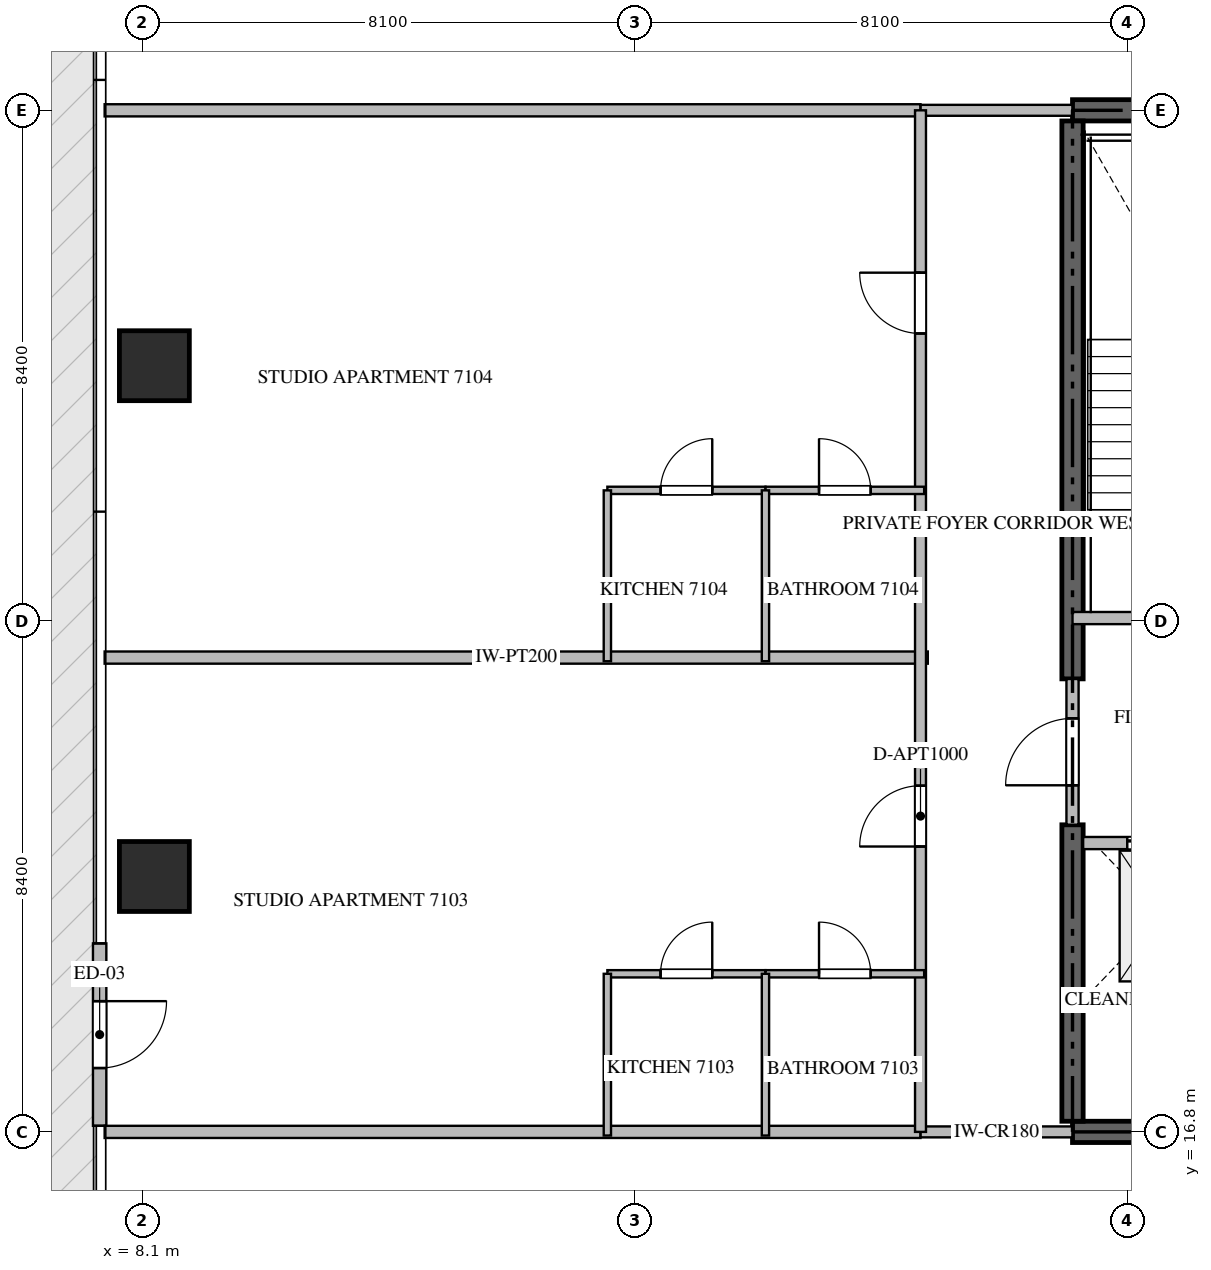
"""IFC4 building model, lengths in metres.
Left out: names, types, materials, properties, quantities, classifications, styles, units other than length and angle.
Written with IfcOpenShell. Run it as: python <this file> out.ifc"""

import sys

from ifc_helpers import new_model, si_unit, direction, frame, frame_2d, origin, origin_2d, place, context, subcontext, project, spatial, rectangle, extrude, source, transform, mapped, element, fill, save


model = new_model("IFC4")
c1 = context("Model", 3, precision=1e-05, world=origin(), true_north=direction((0.0, 1.0)))
c2 = subcontext(c1, "Body", "Model", "MODEL_VIEW")
j1 = project(units=[si_unit("LENGTHUNIT", "METRE"), si_unit("PLANEANGLEUNIT", "RADIAN")], contexts=[c1])
p1 = place(None, origin())
s1 = spatial("IfcSite", under=j1, at=p1, CompositionType="ELEMENT")
p2 = place(p1, origin())
s2 = spatial("IfcBuilding", under=s1, at=p2, CompositionType="ELEMENT")
p3 = place(p2, frame((0.0, 0.0, 283.6)))
s3 = spatial("IfcBuildingStorey", under=s2, at=p3, CompositionType="ELEMENT", Elevation=283.6)
for number, where, z_axis, x_axis in (
    (1, (23.4, 16.8, -0.26), (0.0, 0.0, 1.0), (1.0, 0.0, 0.0)),
    (2, (41.4, 33.6, -0.26), (0.0, 0.0, 1.0), (-1.0, 0.0, 0.0)),
):
    element("IfcWall", number, at=place(p3, frame(where, z_axis=z_axis, x_axis=x_axis)), inside=s3, PredefinedType="SHEAR", context=c2, shape_type="SweptSolid", body=[
        extrude(rectangle(XDim=18.0, YDim=0.35, at=frame_2d((9.0, 0.0))), origin(), (0.0, 0.0, 1.0), 3.668),
    ])
p4 = place(p3, frame((23.4, 16.975, -0.26), z_axis=(0.0, 0.0, 1.0), x_axis=(0.0, 1.0, 0.0)))
e3 = element("IfcWall", 3, at=p4, inside=s3, PredefinedType="SHEAR", context=c2, shape_type="SweptSolid", body=[
    extrude(rectangle(XDim=4.875, YDim=0.35, at=frame_2d((2.438, 0.0))), origin(), (0.0, 0.0, 1.0), 3.668),
])
p5 = place(p3, frame((23.4, 24.25, -0.26), z_axis=(0.0, 0.0, 1.0), x_axis=(0.0, 1.0, 0.0)))
e4 = element("IfcWall", 4, at=p5, inside=s3, PredefinedType="SHEAR", context=c2, shape_type="SweptSolid", body=[
    extrude(rectangle(XDim=9.175, YDim=0.35, at=frame_2d((4.587, 0.0))), origin(), (0.0, 0.0, 1.0), 3.668),
])
m1 = source(origin(), c2, "Body", "SweptSolid", [
    extrude(rectangle(XDim=1.15, YDim=1.15, at=origin_2d()), origin(), (0.0, 0.0, 1.0), 3.67),
])
for number, where, z_axis, x_axis in (
    (5, (8.3, 21.0, -0.26), (0.0, 0.0, 1.0), (1.0, 0.0, 0.0)),
    (6, (8.3, 29.4, -0.26), (0.0, 0.0, 1.0), (1.0, 0.0, 0.0)),
):
    element("IfcColumn", number, at=place(p3, frame(where, z_axis=z_axis, x_axis=x_axis)), inside=s3, PredefinedType="COLUMN", context=c2, shape_type="MappedRepresentation", body=[
        mapped(m1, transform((0.0, 0.0, 0.0), scale=1.0)),
    ])
p6 = place(p3, frame((7.4, 19.9, 0.0), z_axis=(0.0, 0.0, 1.0), x_axis=(0.0, -1.0, 0.0)))
e7 = element("IfcWall", 7, at=p6, inside=s3, PredefinedType="ELEMENTEDWALL", context=c2, shape_type="SweptSolid", body=[
    extrude(rectangle(XDim=3.0, YDim=0.22, at=frame_2d((1.5, 0.0))), origin(), (0.0, 0.0, 1.0), 3.395),
])
p7 = place(p6, frame((0.95, 0.0, 0.0)))
e8 = element("IfcOpeningElement", 8, at=p7, cuts=e7, PredefinedType="OPENING", context=c2, shape_type="SweptSolid", body=[
    extrude(rectangle(XDim=1.1, YDim=2.2, at=frame_2d((0.55, 1.1))), frame((0.0, 0.12, 0.0), z_axis=(0.0, -1.0, 0.0), x_axis=(1.0, 0.0, 0.0)), (0.0, 0.0, 1.0), 0.24),
])
p8 = place(p3, frame((23.4, 25.25, 0.0), z_axis=(0.0, 0.0, 1.0), x_axis=(1.0, 0.0, 0.0)))
e9 = element("IfcWall", 9, at=p8, inside=s3, PredefinedType="STANDARD", context=c2, shape_type="SweptSolid", body=[
    extrude(rectangle(XDim=4.45, YDim=0.2, at=frame_2d((2.225, 0.0))), origin(), (0.0, 0.0, 1.0), 3.41),
])
p9 = place(p8, frame((1.65, 0.0, 0.0)))
e10 = element("IfcOpeningElement", 10, at=p9, cuts=e9, PredefinedType="OPENING", context=c2, shape_type="SweptSolid", body=[
    extrude(rectangle(XDim=1.1, YDim=2.15, at=frame_2d((0.55, 1.075))), frame((0.0, 0.11, 0.0), z_axis=(0.0, -1.0, 0.0), x_axis=(1.0, 0.0, 0.0)), (0.0, 0.0, 1.0), 0.22),
])
p10 = place(p3, frame((23.575, 21.55, 0.0), z_axis=(0.0, 0.0, 1.0), x_axis=(1.0, 0.0, 0.0)))
e11 = element("IfcWall", 11, at=p10, inside=s3, PredefinedType="STANDARD", context=c2, shape_type="SweptSolid", body=[
    extrude(rectangle(XDim=2.475, YDim=0.2, at=frame_2d((1.238, 0.0))), origin(), (0.0, 0.0, 1.0), 3.41),
])
p11 = place(p10, frame((0.725, 0.0, 0.0)))
e12 = element("IfcOpeningElement", 12, at=p11, cuts=e11, PredefinedType="OPENING", context=c2, shape_type="SweptSolid", body=[
    extrude(rectangle(XDim=1.2, YDim=2.2, at=frame_2d((0.6, 1.1))), frame((0.0, 0.11, 0.0), z_axis=(0.0, -1.0, 0.0), x_axis=(1.0, 0.0, 0.0)), (0.0, 0.0, 1.0), 0.22),
])
p12 = place(p3, frame((23.575, 19.05, 0.0), z_axis=(0.0, 0.0, 1.0), x_axis=(1.0, 0.0, 0.0)))
e13 = element("IfcWall", 13, at=p12, inside=s3, PredefinedType="STANDARD", context=c2, shape_type="SweptSolid", body=[
    extrude(rectangle(XDim=2.475, YDim=0.2, at=frame_2d((1.238, 0.0))), origin(), (0.0, 0.0, 1.0), 3.41),
])
p13 = place(p3, frame((23.4, 21.852, 0.0), z_axis=(0.0, 0.0, 1.0), x_axis=(0.0, 1.0, 0.0)))
e14 = element("IfcWall", 14, at=p13, inside=s3, PredefinedType="STANDARD", context=c2, shape_type="SweptSolid", body=[
    extrude(rectangle(XDim=2.396, YDim=0.2, at=frame_2d((1.198, 0.0))), origin(), (0.0, 0.0, 1.0), 3.41),
])
p14 = place(p13, frame((0.648, 0.0, 0.0)))
e15 = element("IfcOpeningElement", 15, at=p14, cuts=e14, PredefinedType="OPENING", context=c2, shape_type="SweptSolid", body=[
    extrude(rectangle(XDim=1.1, YDim=2.15, at=frame_2d((0.55, 1.075))), frame((0.0, 0.11, 0.0), z_axis=(0.0, -1.0, 0.0), x_axis=(1.0, 0.0, 0.0)), (0.0, 0.0, 1.0), 0.22),
])
p15 = place(p3, frame((7.482, 24.6, 0.0), z_axis=(0.0, 0.0, 1.0), x_axis=(1.0, 0.0, 0.0)))
e16 = element("IfcWall", 16, at=p15, inside=s3, PredefinedType="PARTITIONING", context=c2, shape_type="SweptSolid", body=[
    extrude(rectangle(XDim=13.538, YDim=0.2, at=frame_2d((6.769, 0.0))), origin(), (0.0, 0.0, 1.0), 3.41),
])
for number, where, z_axis, x_axis in (
    (17, (7.482, 16.8, 0.0), (0.0, 0.0, 1.0), (1.0, 0.0, 0.0)),
    (18, (7.482, 33.6, 0.0), (0.0, 0.0, 1.0), (1.0, 0.0, 0.0)),
):
    element("IfcWall", number, at=place(p3, frame(where, z_axis=z_axis, x_axis=x_axis)), inside=s3, PredefinedType="PARTITIONING", context=c2, shape_type="SweptSolid", body=[
        extrude(rectangle(XDim=13.418, YDim=0.2, at=frame_2d((6.709, 0.0))), origin(), (0.0, 0.0, 1.0), 3.41),
    ])
for number, where, z_axis, x_axis in (
    (19, (20.902, 16.8, 0.0), (0.0, 0.0, 1.0), (1.0, 0.0, 0.0)),
    (20, (20.902, 33.6, 0.0), (0.0, 0.0, 1.0), (1.0, 0.0, 0.0)),
):
    element("IfcWall", number, at=place(p3, frame(where, z_axis=z_axis, x_axis=x_axis)), inside=s3, PredefinedType="PARTITIONING", context=c2, shape_type="SweptSolid", body=[
        extrude(rectangle(XDim=2.496, YDim=0.18, at=frame_2d((1.248, 0.0))), origin(), (0.0, 0.0, 1.0), 3.41),
    ])
p16 = place(p3, frame((20.9, 16.8, 0.0), z_axis=(0.0, 0.0, 1.0), x_axis=(0.0, 1.0, 0.0)))
e21 = element("IfcWall", 21, at=p16, inside=s3, PredefinedType="PARTITIONING", context=c2, shape_type="SweptSolid", body=[
    extrude(rectangle(XDim=16.8, YDim=0.18, at=frame_2d((8.4, 0.0))), origin(), (0.0, 0.0, 1.0), 3.41),
])
p17 = place(p16, frame((4.693, 0.0, 0.0)))
e22 = element("IfcOpeningElement", 22, at=p17, cuts=e21, PredefinedType="OPENING", context=c2, shape_type="SweptSolid", body=[
    extrude(rectangle(XDim=1.0, YDim=2.15, at=frame_2d((0.5, 1.075))), frame((0.0, 0.1, 0.0), z_axis=(0.0, -1.0, 0.0), x_axis=(1.0, 0.0, 0.0)), (0.0, 0.0, 1.0), 0.2),
])
p18 = place(p16, frame((13.13, 0.0, 0.0)))
e23 = element("IfcOpeningElement", 23, at=p18, cuts=e21, PredefinedType="OPENING", context=c2, shape_type="SweptSolid", body=[
    extrude(rectangle(XDim=1.0, YDim=2.15, at=frame_2d((0.5, 1.075))), frame((0.0, 0.1, 0.0), z_axis=(0.0, -1.0, 0.0), x_axis=(1.0, 0.0, 0.0)), (0.0, 0.0, 1.0), 0.2),
])
p19 = place(p3, frame((15.75, 19.4, 0.0), z_axis=(0.0, 0.0, 1.0), x_axis=(1.0, 0.0, 0.0)))
e24 = element("IfcWall", 24, at=p19, inside=s3, PredefinedType="PARTITIONING", context=c2, shape_type="SweptSolid", body=[
    extrude(rectangle(XDim=2.6, YDim=0.12, at=frame_2d((1.3, 0.0))), origin(), (0.0, 0.0, 1.0), 3.41),
])
p20 = place(p19, frame((0.875, 0.0, 0.0)))
e25 = element("IfcOpeningElement", 25, at=p20, cuts=e24, PredefinedType="OPENING", context=c2, shape_type="SweptSolid", body=[
    extrude(rectangle(XDim=0.85, YDim=2.1, at=frame_2d((0.425, 1.05))), frame((0.0, 0.07, 0.0), z_axis=(0.0, -1.0, 0.0), x_axis=(1.0, 0.0, 0.0)), (0.0, 0.0, 1.0), 0.14),
])
p21 = place(p3, frame((18.352, 19.4, 0.0), z_axis=(0.0, 0.0, 1.0), x_axis=(1.0, 0.0, 0.0)))
e26 = element("IfcWall", 26, at=p21, inside=s3, PredefinedType="PARTITIONING", context=c2, shape_type="SweptSolid", body=[
    extrude(rectangle(XDim=2.608, YDim=0.12, at=frame_2d((1.304, 0.0))), origin(), (0.0, 0.0, 1.0), 3.41),
])
p22 = place(p21, frame((0.879, 0.0, 0.0)))
e27 = element("IfcOpeningElement", 27, at=p22, cuts=e26, PredefinedType="OPENING", context=c2, shape_type="SweptSolid", body=[
    extrude(rectangle(XDim=0.85, YDim=2.1, at=frame_2d((0.425, 1.05))), frame((0.0, 0.07, 0.0), z_axis=(0.0, -1.0, 0.0), x_axis=(1.0, 0.0, 0.0)), (0.0, 0.0, 1.0), 0.14),
])
p23 = place(p3, frame((18.35, 16.74, 0.0), z_axis=(0.0, 0.0, 1.0), x_axis=(0.0, 1.0, 0.0)))
e28 = element("IfcWall", 28, at=p23, inside=s3, PredefinedType="PARTITIONING", context=c2, shape_type="SweptSolid", body=[
    extrude(rectangle(XDim=2.66, YDim=0.12, at=frame_2d((1.33, 0.0))), origin(), (0.0, 0.0, 1.0), 3.41),
])
p24 = place(p3, frame((15.75, 16.74, 0.0), z_axis=(0.0, 0.0, 1.0), x_axis=(0.0, 1.0, 0.0)))
e29 = element("IfcWall", 29, at=p24, inside=s3, PredefinedType="PARTITIONING", context=c2, shape_type="SweptSolid", body=[
    extrude(rectangle(XDim=2.66, YDim=0.12, at=frame_2d((1.33, 0.0))), origin(), (0.0, 0.0, 1.0), 2.245),
])
p25 = place(p3, frame((15.75, 27.35, 0.0), z_axis=(0.0, 0.0, 1.0), x_axis=(1.0, 0.0, 0.0)))
e30 = element("IfcWall", 30, at=p25, inside=s3, PredefinedType="PARTITIONING", context=c2, shape_type="SweptSolid", body=[
    extrude(rectangle(XDim=2.6, YDim=0.12, at=frame_2d((1.3, 0.0))), origin(), (0.0, 0.0, 1.0), 3.41),
])
p26 = place(p25, frame((0.875, 0.0, 0.0)))
e31 = element("IfcOpeningElement", 31, at=p26, cuts=e30, PredefinedType="OPENING", context=c2, shape_type="SweptSolid", body=[
    extrude(rectangle(XDim=0.85, YDim=2.1, at=frame_2d((0.425, 1.05))), frame((0.0, 0.07, 0.0), z_axis=(0.0, -1.0, 0.0), x_axis=(1.0, 0.0, 0.0)), (0.0, 0.0, 1.0), 0.14),
])
p27 = place(p3, frame((18.352, 27.35, 0.0), z_axis=(0.0, 0.0, 1.0), x_axis=(1.0, 0.0, 0.0)))
e32 = element("IfcWall", 32, at=p27, inside=s3, PredefinedType="PARTITIONING", context=c2, shape_type="SweptSolid", body=[
    extrude(rectangle(XDim=2.608, YDim=0.12, at=frame_2d((1.304, 0.0))), origin(), (0.0, 0.0, 1.0), 3.41),
])
p28 = place(p27, frame((0.879, 0.0, 0.0)))
e33 = element("IfcOpeningElement", 33, at=p28, cuts=e32, PredefinedType="OPENING", context=c2, shape_type="SweptSolid", body=[
    extrude(rectangle(XDim=0.85, YDim=2.1, at=frame_2d((0.425, 1.05))), frame((0.0, 0.07, 0.0), z_axis=(0.0, -1.0, 0.0), x_axis=(1.0, 0.0, 0.0)), (0.0, 0.0, 1.0), 0.14),
])
for number, where, z_axis, x_axis in (
    (34, (18.35, 24.54, 0.0), (0.0, 0.0, 1.0), (0.0, 1.0, 0.0)),
    (35, (15.75, 24.54, 0.0), (0.0, 0.0, 1.0), (0.0, 1.0, 0.0)),
):
    element("IfcWall", number, at=place(p3, frame(where, z_axis=z_axis, x_axis=x_axis)), inside=s3, PredefinedType="PARTITIONING", context=c2, shape_type="SweptSolid", body=[
        extrude(rectangle(XDim=2.81, YDim=0.12, at=frame_2d((1.405, 0.0))), origin(), (0.0, 0.0, 1.0), 3.41),
    ])
m2 = source(origin(), c2, "Body", "SweptSolid", [
    extrude(rectangle(XDim=1.1, YDim=2.2, at=frame_2d((0.55, 1.1))), frame((0.0, 0.025, 0.0), z_axis=(0.0, -1.0, 0.0), x_axis=(1.0, 0.0, 0.0)), (0.0, 0.0, 1.0), 0.05),
])
p29 = place(p7, origin())
e36 = element("IfcDoor", 36, at=p29, inside=s3, OperationType="SINGLE_SWING_LEFT", PredefinedType="DOOR", context=c2, shape_type="MappedRepresentation", body=[
    mapped(m2, transform((0.0, 0.0, 0.0), scale=1.0)),
])
fill(e8, e36)
m3 = source(origin(), c2, "Body", "SweptSolid", [
    extrude(rectangle(XDim=1.2, YDim=2.2, at=frame_2d((0.6, 1.1))), frame((0.0, 0.025, 0.0), z_axis=(0.0, -1.0, 0.0), x_axis=(1.0, 0.0, 0.0)), (0.0, 0.0, 1.0), 0.05),
])
p30 = place(p11, origin())
e37 = element("IfcDoor", 37, at=p30, inside=s3, OperationType="DOUBLE_DOOR_SLIDING", PredefinedType="DOOR", context=c2, shape_type="MappedRepresentation", body=[
    mapped(m3, transform((0.0, 0.0, 0.0), scale=1.0)),
])
fill(e12, e37)
m4 = source(origin(), c2, "Body", "SweptSolid", [
    extrude(rectangle(XDim=1.1, YDim=2.15, at=frame_2d((0.55, 1.075))), frame((0.0, 0.025, 0.0), z_axis=(0.0, -1.0, 0.0), x_axis=(1.0, 0.0, 0.0)), (0.0, 0.0, 1.0), 0.05),
])
p31 = place(p14, origin())
e38 = element("IfcDoor", 38, at=p31, inside=s3, OperationType="SINGLE_SWING_LEFT", PredefinedType="DOOR", context=c2, shape_type="MappedRepresentation", body=[
    mapped(m4, transform((0.0, 0.0, 0.0), scale=1.0)),
])
fill(e15, e38)
m5 = source(origin(), c2, "Body", "SweptSolid", [
    extrude(rectangle(XDim=1.0, YDim=2.15, at=frame_2d((0.5, 1.075))), frame((0.0, 0.025, 0.0), z_axis=(0.0, -1.0, 0.0), x_axis=(1.0, 0.0, 0.0)), (0.0, 0.0, 1.0), 0.05),
])
p32 = place(p17, origin())
e39 = element("IfcDoor", 39, at=p32, inside=s3, OperationType="SINGLE_SWING_LEFT", PredefinedType="DOOR", context=c2, shape_type="MappedRepresentation", body=[
    mapped(m5, transform((0.0, 0.0, 0.0), scale=1.0)),
])
fill(e22, e39)
p33 = place(p18, origin())
e40 = element("IfcDoor", 40, at=p33, inside=s3, OperationType="SINGLE_SWING_RIGHT", PredefinedType="DOOR", context=c2, shape_type="MappedRepresentation", body=[
    mapped(m5, transform((0.0, 0.0, 0.0), scale=1.0)),
])
fill(e23, e40)
m6 = source(origin(), c2, "Body", "SweptSolid", [
    extrude(rectangle(XDim=0.85, YDim=2.1, at=frame_2d((0.425, 1.05))), frame((0.0, 0.025, 0.0), z_axis=(0.0, -1.0, 0.0), x_axis=(1.0, 0.0, 0.0)), (0.0, 0.0, 1.0), 0.05),
])
p34 = place(p20, origin())
e41 = element("IfcDoor", 41, at=p34, inside=s3, OperationType="SINGLE_SWING_RIGHT", PredefinedType="DOOR", context=c2, shape_type="MappedRepresentation", body=[
    mapped(m6, transform((0.0, 0.0, 0.0), scale=1.0)),
])
fill(e25, e41)
p35 = place(p22, origin())
e42 = element("IfcDoor", 42, at=p35, inside=s3, OperationType="SINGLE_SWING_LEFT", PredefinedType="DOOR", context=c2, shape_type="MappedRepresentation", body=[
    mapped(m6, transform((0.0, 0.0, 0.0), scale=1.0)),
])
fill(e27, e42)
p36 = place(p26, origin())
e43 = element("IfcDoor", 43, at=p36, inside=s3, OperationType="SINGLE_SWING_RIGHT", PredefinedType="DOOR", context=c2, shape_type="MappedRepresentation", body=[
    mapped(m6, transform((0.0, 0.0, 0.0), scale=1.0)),
])
fill(e31, e43)
p37 = place(p28, origin())
e44 = element("IfcDoor", 44, at=p37, inside=s3, OperationType="SINGLE_SWING_LEFT", PredefinedType="DOOR", context=c2, shape_type="MappedRepresentation", body=[
    mapped(m6, transform((0.0, 0.0, 0.0), scale=1.0)),
])
fill(e33, e44)
save(model, sys.argv[1])
